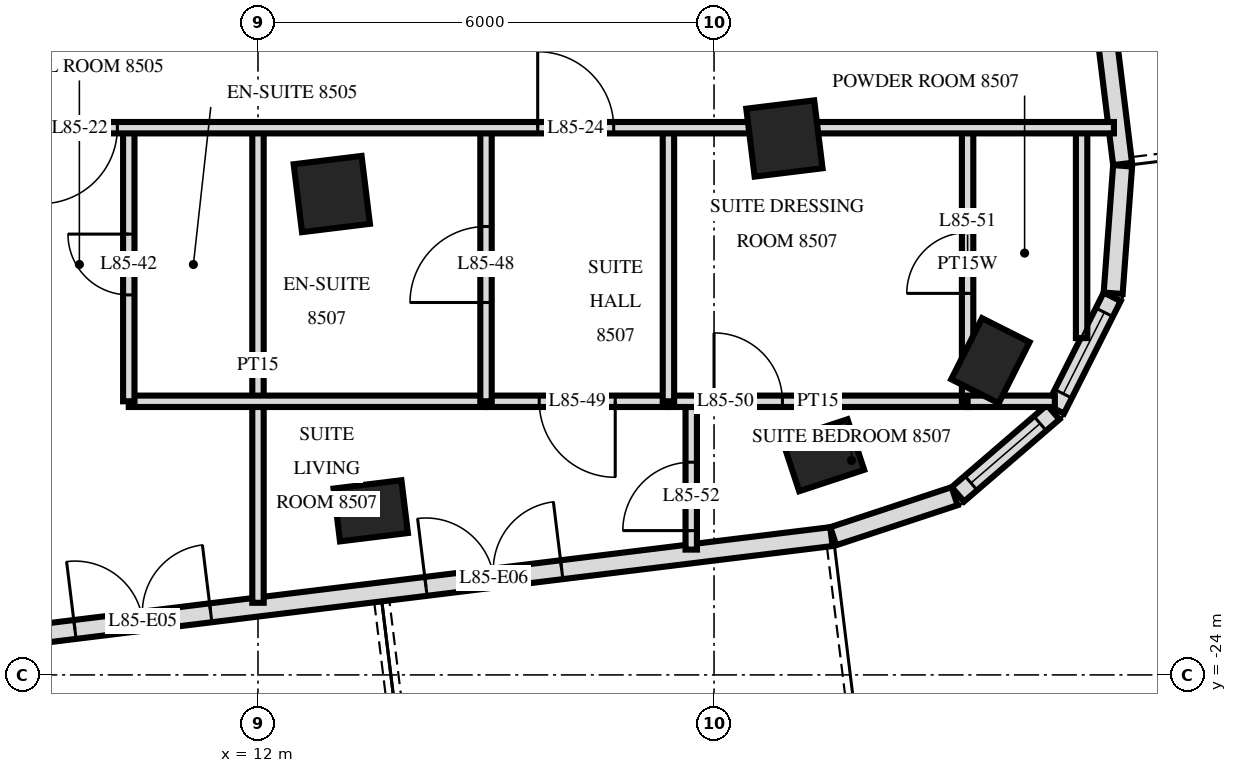
"""IFC4 building model, lengths in metres.
Left out: names, types, materials, properties, quantities, classifications, styles, units other than length and angle.
Written with IfcOpenShell. Run it as: python <this file> out.ifc"""

import sys

from ifc_helpers import new_model, si_unit, direction, frame, frame_2d, origin, origin_2d, place, context, subcontext, project, spatial, rectangle, extrude, element, fill, save


model = new_model("IFC4")
c1 = context("Model", 3, precision=1e-05, world=origin(), true_north=direction((0.0, 1.0)))
c2 = subcontext(c1, "Body", "Model", "MODEL_VIEW")
j1 = project(units=[si_unit("LENGTHUNIT", "METRE"), si_unit("PLANEANGLEUNIT", "RADIAN")], contexts=[c1])
p1 = place(None, origin())
s1 = spatial("IfcSite", under=j1, at=p1, CompositionType="ELEMENT")
p2 = place(p1, origin())
s2 = spatial("IfcBuilding", under=s1, at=p2, CompositionType="ELEMENT")
p3 = place(p2, frame((0.0, 0.0, 322.6)))
s3 = spatial("IfcBuildingStorey", under=s2, at=p3, CompositionType="ELEMENT", Elevation=322.6)
p4 = place(p3, frame((12.971, -17.673, 0.0), z_axis=(0.0, 0.0, 1.0), x_axis=(0.992546151641, 0.121869343405, 0.0)))
e1 = element("IfcColumn", 1, at=p4, inside=s3, PredefinedType="COLUMN", context=c2, shape_type="SweptSolid", body=[
    extrude(rectangle(XDim=0.9, YDim=0.9, at=origin_2d()), origin(), (0.0, 0.0, 1.0), 4.0),
])
p5 = place(p3, frame((13.483, -21.841, 0.0), z_axis=(0.0, 0.0, 1.0), x_axis=(0.992546151641, 0.121869343405, 0.0)))
e2 = element("IfcColumn", 2, at=p5, inside=s3, PredefinedType="COLUMN", context=c2, shape_type="SweptSolid", body=[
    extrude(rectangle(XDim=0.9, YDim=0.7, at=origin_2d()), origin(), (0.0, 0.0, 1.0), 4.0),
])
p6 = place(p3, frame((18.926, -16.942, 0.0), z_axis=(0.0, 0.0, 1.0), x_axis=(0.992546151641, 0.121869343405, 0.0)))
e3 = element("IfcColumn", 3, at=p6, inside=s3, PredefinedType="COLUMN", context=c2, shape_type="SweptSolid", body=[
    extrude(rectangle(XDim=0.9, YDim=0.9, at=origin_2d()), origin(), (0.0, 0.0, 1.0), 4.0),
])
for number, where, z_axis, x_axis in (
    (4, (19.438, -21.11, 0.0), (0.0, 0.0, 1.0), (0.95, 0.313, 0.0)),
    (5, (21.636, -19.866, 0.0), (0.0, 0.0, 1.0), (0.45, 0.893, 0.0)),
):
    element("IfcColumn", number, at=place(p3, frame(where, z_axis=z_axis, x_axis=x_axis)), inside=s3, PredefinedType="COLUMN", context=c2, shape_type="SweptSolid", body=[
        extrude(rectangle(XDim=0.9, YDim=0.7, at=origin_2d()), origin(), (0.0, 0.0, 1.0), 4.0),
    ])
p7 = place(p3, frame((-16.138, -26.561, 0.0), z_axis=(0.0, 0.0, 1.0), x_axis=(0.992546726876, 0.121864658405, 0.0)))
e6 = element("IfcWall", 6, at=p7, inside=s3, PredefinedType="SOLIDWALL", context=c2, shape_type="SweptSolid", body=[
    extrude(rectangle(XDim=35.951, YDim=0.25, at=frame_2d((17.975, 0.0))), origin(), (0.0, 0.0, 1.0), 3.72),
])
p8 = place(p7, frame((0.575, 0.0, 0.0)))
e7 = element("IfcOpeningElement", 7, at=p8, cuts=e6, PredefinedType="OPENING", context=c2, shape_type="SweptSolid", body=[
    extrude(rectangle(XDim=1.8, YDim=2.4, at=frame_2d((0.9, 1.2))), frame((0.0, 0.135, 0.0), z_axis=(0.0, -1.0, 0.0), x_axis=(1.0, 0.0, 0.0)), (0.0, 0.0, 1.0), 0.27),
])
p9 = place(p7, frame((6.576, 0.0, 0.0)))
e8 = element("IfcOpeningElement", 8, at=p9, cuts=e6, PredefinedType="OPENING", context=c2, shape_type="SweptSolid", body=[
    extrude(rectangle(XDim=1.8, YDim=2.4, at=frame_2d((0.9, 1.2))), frame((0.0, 0.135, 0.0), z_axis=(0.0, -1.0, 0.0), x_axis=(1.0, 0.0, 0.0)), (0.0, 0.0, 1.0), 0.27),
])
p10 = place(p7, frame((12.575, 0.0, 0.0)))
e9 = element("IfcOpeningElement", 9, at=p10, cuts=e6, PredefinedType="OPENING", context=c2, shape_type="SweptSolid", body=[
    extrude(rectangle(XDim=1.8, YDim=2.4, at=frame_2d((0.9, 1.2))), frame((0.0, 0.135, 0.0), z_axis=(0.0, -1.0, 0.0), x_axis=(1.0, 0.0, 0.0)), (0.0, 0.0, 1.0), 0.27),
])
p11 = place(p7, frame((18.575, 0.0, 0.0)))
e10 = element("IfcOpeningElement", 10, at=p11, cuts=e6, PredefinedType="OPENING", context=c2, shape_type="SweptSolid", body=[
    extrude(rectangle(XDim=1.8, YDim=2.4, at=frame_2d((0.9, 1.2))), frame((0.0, 0.135, 0.0), z_axis=(0.0, -1.0, 0.0), x_axis=(1.0, 0.0, 0.0)), (0.0, 0.0, 1.0), 0.27),
])
p12 = place(p7, frame((22.528, 0.0, 0.0)))
e11 = element("IfcOpeningElement", 11, at=p12, cuts=e6, PredefinedType="OPENING", context=c2, shape_type="SweptSolid", body=[
    extrude(rectangle(XDim=1.2, YDim=2.4, at=frame_2d((0.6, 1.2))), frame((0.0, 0.135, 0.0), z_axis=(0.0, -1.0, 0.0), x_axis=(1.0, 0.0, 0.0)), (0.0, 0.0, 1.0), 0.27),
])
p13 = place(p7, frame((25.923, 0.0, 0.0)))
e12 = element("IfcOpeningElement", 12, at=p13, cuts=e6, PredefinedType="OPENING", context=c2, shape_type="SweptSolid", body=[
    extrude(rectangle(XDim=1.8, YDim=2.4, at=frame_2d((0.9, 1.2))), frame((0.0, 0.135, 0.0), z_axis=(0.0, -1.0, 0.0), x_axis=(1.0, 0.0, 0.0)), (0.0, 0.0, 1.0), 0.27),
])
p14 = place(p7, frame((30.576, 0.0, 0.0)))
e13 = element("IfcOpeningElement", 13, at=p14, cuts=e6, PredefinedType="OPENING", context=c2, shape_type="SweptSolid", body=[
    extrude(rectangle(XDim=1.8, YDim=2.4, at=frame_2d((0.9, 1.2))), frame((0.0, 0.135, 0.0), z_axis=(0.0, -1.0, 0.0), x_axis=(1.0, 0.0, 0.0)), (0.0, 0.0, 1.0), 0.27),
])
p15 = place(p3, frame((19.568, -22.175, 0.0), z_axis=(0.0, 0.0, 1.0), x_axis=(0.949694735798, 0.313177120489, 0.0)))
e14 = element("IfcWall", 14, at=p15, inside=s3, PredefinedType="SOLIDWALL", context=c2, shape_type="SweptSolid", body=[
    extrude(rectangle(XDim=1.681, YDim=0.25, at=frame_2d((0.841, 0.0))), origin(), (0.0, 0.0, 1.0), 3.72),
])
p16 = place(p3, frame((21.208, -21.624, 0.0), z_axis=(0.0, 0.0, 1.0), x_axis=(0.757568315466, 0.652755886531, 0.0)))
e15 = element("IfcWall", 15, at=p16, inside=s3, PredefinedType="SOLIDWALL", context=c2, shape_type="SweptSolid", body=[
    extrude(rectangle(XDim=1.656, YDim=0.25, at=frame_2d((0.828, 0.0))), origin(), (0.0, 0.0, 1.0), 3.72),
])
p17 = place(p16, frame((0.228, 0.0, 0.9)))
e16 = element("IfcOpeningElement", 16, at=p17, cuts=e15, PredefinedType="OPENING", context=c2, shape_type="SweptSolid", body=[
    extrude(rectangle(XDim=1.2, YDim=1.5, at=frame_2d((0.6, 0.75))), frame((0.0, 0.135, 0.0), z_axis=(0.0, -1.0, 0.0), x_axis=(1.0, 0.0, 0.0)), (0.0, 0.0, 1.0), 0.27),
])
p18 = place(p3, frame((22.493, -20.505, 0.0), z_axis=(0.0, 0.0, 1.0), x_axis=(0.449982385812, 0.893037430604, 0.0)))
e17 = element("IfcWall", 17, at=p18, inside=s3, PredefinedType="SOLIDWALL", context=c2, shape_type="SweptSolid", body=[
    extrude(rectangle(XDim=1.656, YDim=0.25, at=frame_2d((0.828, 0.0))), origin(), (0.0, 0.0, 1.0), 3.72),
])
p19 = place(p18, frame((0.228, 0.0, 0.9)))
e18 = element("IfcOpeningElement", 18, at=p19, cuts=e17, PredefinedType="OPENING", context=c2, shape_type="SweptSolid", body=[
    extrude(rectangle(XDim=1.2, YDim=1.5, at=frame_2d((0.6, 0.75))), frame((0.0, 0.135, 0.0), z_axis=(0.0, -1.0, 0.0), x_axis=(1.0, 0.0, 0.0)), (0.0, 0.0, 1.0), 0.27),
])
p20 = place(p3, frame((23.251, -18.979, 0.0), z_axis=(0.0, 0.0, 1.0), x_axis=(0.074053534713, 0.997254267475, 0.0)))
e19 = element("IfcWall", 19, at=p20, inside=s3, PredefinedType="SOLIDWALL", context=c2, shape_type="SweptSolid", body=[
    extrude(rectangle(XDim=1.681, YDim=0.25, at=frame_2d((0.841, 0.0))), origin(), (0.0, 0.0, 1.0), 3.72),
])
p21 = place(p3, frame((23.375, -17.277, 0.0), z_axis=(0.0, 0.0, 1.0), x_axis=(-0.121862878281, 0.992546945437, 0.0)))
e20 = element("IfcWall", 20, at=p21, inside=s3, PredefinedType="SOLIDWALL", context=c2, shape_type="SweptSolid", body=[
    extrude(rectangle(XDim=19.151, YDim=0.25, at=frame_2d((9.575, 0.0))), origin(), (0.0, 0.0, 1.0), 3.72),
])
p22 = place(p21, frame((2.479, 0.0, 0.0)))
e21 = element("IfcOpeningElement", 21, at=p22, cuts=e20, PredefinedType="OPENING", context=c2, shape_type="SweptSolid", body=[
    extrude(rectangle(XDim=1.8, YDim=2.4, at=frame_2d((0.9, 1.2))), frame((0.0, 0.135, 0.0), z_axis=(0.0, -1.0, 0.0), x_axis=(1.0, 0.0, 0.0)), (0.0, 0.0, 1.0), 0.27),
])
p23 = place(p21, frame((5.575, 0.0, 0.0)))
e22 = element("IfcOpeningElement", 22, at=p23, cuts=e20, PredefinedType="OPENING", context=c2, shape_type="SweptSolid", body=[
    extrude(rectangle(XDim=1.8, YDim=2.4, at=frame_2d((0.9, 1.2))), frame((0.0, 0.135, 0.0), z_axis=(0.0, -1.0, 0.0), x_axis=(1.0, 0.0, 0.0)), (0.0, 0.0, 1.0), 0.27),
])
p24 = place(p21, frame((11.807, 0.0, 0.0)))
e23 = element("IfcOpeningElement", 23, at=p24, cuts=e20, PredefinedType="OPENING", context=c2, shape_type="SweptSolid", body=[
    extrude(rectangle(XDim=1.8, YDim=2.4, at=frame_2d((0.9, 1.2))), frame((0.0, 0.135, 0.0), z_axis=(0.0, -1.0, 0.0), x_axis=(1.0, 0.0, 0.0)), (0.0, 0.0, 1.0), 0.27),
])
p25 = place(p3, frame((22.836, -19.568, 0.0), z_axis=(0.0, 0.0, 1.0), x_axis=(0.0, 1.0, 0.0)))
e24 = element("IfcWall", 24, at=p25, inside=s3, PredefinedType="PLUMBINGWALL", context=c2, shape_type="SweptSolid", body=[
    extrude(rectangle(XDim=2.768, YDim=0.15, at=frame_2d((1.384, 0.0))), origin(), (0.0, 0.0, 1.0), 3.72),
])
p26 = place(p3, frame((21.336, -20.4, 0.0), z_axis=(0.0, 0.0, 1.0), x_axis=(0.0, 1.0, 0.0)))
e25 = element("IfcWall", 25, at=p26, inside=s3, PredefinedType="PLUMBINGWALL", context=c2, shape_type="SweptSolid", body=[
    extrude(rectangle(XDim=3.6, YDim=0.15, at=frame_2d((1.8, 0.0))), origin(), (0.0, 0.0, 1.0), 3.72),
])
p27 = place(p26, frame((1.42, 0.0, 0.0)))
e26 = element("IfcOpeningElement", 26, at=p27, cuts=e25, PredefinedType="OPENING", context=c2, shape_type="SweptSolid", body=[
    extrude(rectangle(XDim=0.8, YDim=2.1, at=frame_2d((0.4, 1.05))), frame((0.0, 0.085, 0.0), z_axis=(0.0, -1.0, 0.0), x_axis=(1.0, 0.0, 0.0)), (0.0, 0.0, 1.0), 0.17),
])
p28 = place(p3, frame((17.7, -22.351, 0.0), z_axis=(0.0, 0.0, 1.0), x_axis=(0.0, 1.0, 0.0)))
e27 = element("IfcWall", 27, at=p28, inside=s3, PredefinedType="PARTITIONING", context=c2, shape_type="SweptSolid", body=[
    extrude(rectangle(XDim=1.951, YDim=0.15, at=frame_2d((0.976, 0.0))), origin(), (0.0, 0.0, 1.0), 3.72),
])
p29 = place(p28, frame((0.25, 0.0, 0.0)))
e28 = element("IfcOpeningElement", 28, at=p29, cuts=e27, PredefinedType="OPENING", context=c2, shape_type="SweptSolid", body=[
    extrude(rectangle(XDim=0.9, YDim=2.1, at=frame_2d((0.45, 1.05))), frame((0.0, 0.085, 0.0), z_axis=(0.0, -1.0, 0.0), x_axis=(1.0, 0.0, 0.0)), (0.0, 0.0, 1.0), 0.17),
])
p30 = place(p3, frame((17.4, -20.4, 0.0), z_axis=(0.0, 0.0, 1.0), x_axis=(0.0, 1.0, 0.0)))
e29 = element("IfcWall", 29, at=p30, inside=s3, PredefinedType="PARTITIONING", context=c2, shape_type="SweptSolid", body=[
    extrude(rectangle(XDim=3.6, YDim=0.15, at=frame_2d((1.8, 0.0))), origin(), (0.0, 0.0, 1.0), 3.72),
])
p31 = place(p3, frame((15.0, -20.4, 0.0), z_axis=(0.0, 0.0, 1.0), x_axis=(0.0, 1.0, 0.0)))
e30 = element("IfcWall", 30, at=p31, inside=s3, PredefinedType="PARTITIONING", context=c2, shape_type="SweptSolid", body=[
    extrude(rectangle(XDim=3.6, YDim=0.15, at=frame_2d((1.8, 0.0))), origin(), (0.0, 0.0, 1.0), 3.72),
])
p32 = place(p31, frame((1.3, 0.0, 0.0)))
e31 = element("IfcOpeningElement", 31, at=p32, cuts=e30, PredefinedType="OPENING", context=c2, shape_type="SweptSolid", body=[
    extrude(rectangle(XDim=1.0, YDim=2.1, at=frame_2d((0.5, 1.05))), frame((0.0, 0.085, 0.0), z_axis=(0.0, -1.0, 0.0), x_axis=(1.0, 0.0, 0.0)), (0.0, 0.0, 1.0), 0.17),
])
p33 = place(p3, frame((12.0, -23.051, 0.0), z_axis=(0.0, 0.0, 1.0), x_axis=(0.0, 1.0, 0.0)))
e32 = element("IfcWall", 32, at=p33, inside=s3, PredefinedType="PARTITIONING", context=c2, shape_type="SweptSolid", body=[
    extrude(rectangle(XDim=6.251, YDim=0.15, at=frame_2d((3.125, 0.0))), origin(), (0.0, 0.0, 1.0), 3.72),
])
p34 = place(p3, frame((10.3, -20.4, 0.0), z_axis=(0.0, 0.0, 1.0), x_axis=(0.0, 1.0, 0.0)))
e33 = element("IfcWall", 33, at=p34, inside=s3, PredefinedType="PARTITIONING", context=c2, shape_type="SweptSolid", body=[
    extrude(rectangle(XDim=3.6, YDim=0.15, at=frame_2d((1.8, 0.0))), origin(), (0.0, 0.0, 1.0), 3.72),
])
p35 = place(p34, frame((1.4, 0.0, 0.0)))
e34 = element("IfcOpeningElement", 34, at=p35, cuts=e33, PredefinedType="OPENING", context=c2, shape_type="SweptSolid", body=[
    extrude(rectangle(XDim=0.8, YDim=2.1, at=frame_2d((0.4, 1.05))), frame((0.0, 0.085, 0.0), z_axis=(0.0, -1.0, 0.0), x_axis=(1.0, 0.0, 0.0)), (0.0, 0.0, 1.0), 0.17),
])
p36 = place(p3, frame((15.0, -20.4, 0.0), z_axis=(0.0, 0.0, 1.0), x_axis=(1.0, 0.0, 0.0)))
e35 = element("IfcWall", 35, at=p36, inside=s3, PredefinedType="PARTITIONING", context=c2, shape_type="SweptSolid", body=[
    extrude(rectangle(XDim=2.4, YDim=0.15, at=frame_2d((1.2, 0.0))), origin(), (0.0, 0.0, 1.0), 3.72),
])
p37 = place(p36, frame((0.7, 0.0, 0.0)))
e36 = element("IfcOpeningElement", 36, at=p37, cuts=e35, PredefinedType="OPENING", context=c2, shape_type="SweptSolid", body=[
    extrude(rectangle(XDim=1.0, YDim=2.1, at=frame_2d((0.5, 1.05))), frame((0.0, 0.085, 0.0), z_axis=(0.0, -1.0, 0.0), x_axis=(1.0, 0.0, 0.0)), (0.0, 0.0, 1.0), 0.17),
])
p38 = place(p3, frame((10.3, -20.4, 0.0), z_axis=(0.0, 0.0, 1.0), x_axis=(1.0, 0.0, 0.0)))
e37 = element("IfcWall", 37, at=p38, inside=s3, PredefinedType="PARTITIONING", context=c2, shape_type="SweptSolid", body=[
    extrude(rectangle(XDim=4.7, YDim=0.15, at=frame_2d((2.35, 0.0))), origin(), (0.0, 0.0, 1.0), 3.72),
])
p39 = place(p3, frame((17.4, -20.4, 0.0), z_axis=(0.0, 0.0, 1.0), x_axis=(1.0, 0.0, 0.0)))
e38 = element("IfcWall", 38, at=p39, inside=s3, PredefinedType="PARTITIONING", context=c2, shape_type="SweptSolid", body=[
    extrude(rectangle(XDim=3.936, YDim=0.15, at=frame_2d((1.968, 0.0))), origin(), (0.0, 0.0, 1.0), 3.72),
])
p40 = place(p39, frame((0.6, 0.0, 0.0)))
e39 = element("IfcOpeningElement", 39, at=p40, cuts=e38, PredefinedType="OPENING", context=c2, shape_type="SweptSolid", body=[
    extrude(rectangle(XDim=0.9, YDim=2.1, at=frame_2d((0.45, 1.05))), frame((0.0, 0.085, 0.0), z_axis=(0.0, -1.0, 0.0), x_axis=(1.0, 0.0, 0.0)), (0.0, 0.0, 1.0), 0.17),
])
p41 = place(p3, frame((21.336, -20.4, 0.0), z_axis=(0.0, 0.0, 1.0), x_axis=(1.0, 0.0, 0.0)))
e40 = element("IfcWall", 40, at=p41, inside=s3, PredefinedType="PLUMBINGWALL", context=c2, shape_type="SweptSolid", body=[
    extrude(rectangle(XDim=1.148, YDim=0.15, at=frame_2d((0.574, 0.0))), origin(), (0.0, 0.0, 1.0), 3.72),
])
p42 = place(p3, frame((-9.3, -16.8, 0.0), z_axis=(0.0, 0.0, 1.0), x_axis=(1.0, 0.0, 0.0)))
e41 = element("IfcWall", 41, at=p42, inside=s3, PredefinedType="PARTITIONING", context=c2, shape_type="SweptSolid", body=[
    extrude(rectangle(XDim=32.561, YDim=0.15, at=frame_2d((16.281, 0.0))), origin(), (0.0, 0.0, 1.0), 3.72),
])
p43 = place(p42, frame((0.4, 0.0, 0.0)))
e42 = element("IfcOpeningElement", 42, at=p43, cuts=e41, PredefinedType="OPENING", context=c2, shape_type="SweptSolid", body=[
    extrude(rectangle(XDim=1.0, YDim=2.1, at=frame_2d((0.5, 1.05))), frame((0.0, 0.085, 0.0), z_axis=(0.0, -1.0, 0.0), x_axis=(1.0, 0.0, 0.0)), (0.0, 0.0, 1.0), 0.17),
])
p44 = place(p42, frame((7.15, 0.0, 0.0)))
e43 = element("IfcOpeningElement", 43, at=p44, cuts=e41, PredefinedType="OPENING", context=c2, shape_type="SweptSolid", body=[
    extrude(rectangle(XDim=1.0, YDim=2.1, at=frame_2d((0.5, 1.05))), frame((0.0, 0.085, 0.0), z_axis=(0.0, -1.0, 0.0), x_axis=(1.0, 0.0, 0.0)), (0.0, 0.0, 1.0), 0.17),
])
p45 = place(p42, frame((9.7, 0.0, 0.0)))
e44 = element("IfcOpeningElement", 44, at=p45, cuts=e41, PredefinedType="OPENING", context=c2, shape_type="SweptSolid", body=[
    extrude(rectangle(XDim=1.0, YDim=2.1, at=frame_2d((0.5, 1.05))), frame((0.0, 0.085, 0.0), z_axis=(0.0, -1.0, 0.0), x_axis=(1.0, 0.0, 0.0)), (0.0, 0.0, 1.0), 0.17),
])
p46 = place(p42, frame((17.149, 0.0, 0.0)))
e45 = element("IfcOpeningElement", 45, at=p46, cuts=e41, PredefinedType="OPENING", context=c2, shape_type="SweptSolid", body=[
    extrude(rectangle(XDim=1.0, YDim=2.1, at=frame_2d((0.5, 1.05))), frame((0.0, 0.085, 0.0), z_axis=(0.0, -1.0, 0.0), x_axis=(1.0, 0.0, 0.0)), (0.0, 0.0, 1.0), 0.17),
])
p47 = place(p42, frame((18.45, 0.0, 0.0)))
e46 = element("IfcOpeningElement", 46, at=p47, cuts=e41, PredefinedType="OPENING", context=c2, shape_type="SweptSolid", body=[
    extrude(rectangle(XDim=1.0, YDim=2.1, at=frame_2d((0.5, 1.05))), frame((0.0, 0.085, 0.0), z_axis=(0.0, -1.0, 0.0), x_axis=(1.0, 0.0, 0.0)), (0.0, 0.0, 1.0), 0.17),
])
p48 = place(p42, frame((24.98, 0.0, 0.0)))
e47 = element("IfcOpeningElement", 47, at=p48, cuts=e41, PredefinedType="OPENING", context=c2, shape_type="SweptSolid", body=[
    extrude(rectangle(XDim=1.0, YDim=2.1, at=frame_2d((0.5, 1.05))), frame((0.0, 0.085, 0.0), z_axis=(0.0, -1.0, 0.0), x_axis=(1.0, 0.0, 0.0)), (0.0, 0.0, 1.0), 0.17),
])
p49 = place(p17, origin())
e48 = element("IfcWindow", 48, at=p49, inside=s3, PartitioningType="SINGLE_PANEL", PredefinedType="WINDOW", context=c2, shape_type="SweptSolid", body=[
    extrude(rectangle(XDim=1.2, YDim=1.5, at=frame_2d((0.6, 0.75))), frame((0.0, 0.03, 0.0), z_axis=(0.0, -1.0, 0.0), x_axis=(1.0, 0.0, 0.0)), (0.0, 0.0, 1.0), 0.06),
])
fill(e16, e48)
p50 = place(p19, origin())
e49 = element("IfcWindow", 49, at=p50, inside=s3, PartitioningType="SINGLE_PANEL", PredefinedType="WINDOW", context=c2, shape_type="SweptSolid", body=[
    extrude(rectangle(XDim=1.2, YDim=1.5, at=frame_2d((0.6, 0.75))), frame((0.0, 0.03, 0.0), z_axis=(0.0, -1.0, 0.0), x_axis=(1.0, 0.0, 0.0)), (0.0, 0.0, 1.0), 0.06),
])
fill(e18, e49)
p51 = place(p13, origin())
e50 = element("IfcDoor", 50, at=p51, inside=s3, OperationType="DOUBLE_DOOR_SINGLE_SWING", PredefinedType="DOOR", context=c2, shape_type="SweptSolid", body=[
    extrude(rectangle(XDim=1.8, YDim=2.4, at=frame_2d((0.9, 1.2))), frame((0.0, 0.025, 0.0), z_axis=(0.0, -1.0, 0.0), x_axis=(1.0, 0.0, 0.0)), (0.0, 0.0, 1.0), 0.05),
])
fill(e12, e50)
p52 = place(p14, origin())
e51 = element("IfcDoor", 51, at=p52, inside=s3, OperationType="DOUBLE_DOOR_SINGLE_SWING", PredefinedType="DOOR", context=c2, shape_type="SweptSolid", body=[
    extrude(rectangle(XDim=1.8, YDim=2.4, at=frame_2d((0.9, 1.2))), frame((0.0, 0.025, 0.0), z_axis=(0.0, -1.0, 0.0), x_axis=(1.0, 0.0, 0.0)), (0.0, 0.0, 1.0), 0.05),
])
fill(e13, e51)
p53 = place(p47, frame((0.5, 0.0, 0.0), z_axis=(0.0, 0.0, 1.0), x_axis=(-1.0, 0.0, 0.0)))
e52 = element("IfcDoor", 52, at=p53, inside=s3, OperationType="SINGLE_SWING_LEFT", PredefinedType="DOOR", context=c2, shape_type="SweptSolid", body=[
    extrude(rectangle(XDim=1.0, YDim=2.1, at=frame_2d((0.0, 1.05))), frame((0.0, -0.025, 0.0), z_axis=(0.0, 1.0, 0.0), x_axis=(-1.0, 0.0, 0.0)), (0.0, 0.0, 1.0), 0.05),
])
fill(e46, e52)
p54 = place(p48, origin())
e53 = element("IfcDoor", 53, at=p54, inside=s3, OperationType="SINGLE_SWING_RIGHT", PredefinedType="DOOR", context=c2, shape_type="SweptSolid", body=[
    extrude(rectangle(XDim=1.0, YDim=2.1, at=frame_2d((0.5, 1.05))), frame((0.0, 0.025, 0.0), z_axis=(0.0, -1.0, 0.0), x_axis=(1.0, 0.0, 0.0)), (0.0, 0.0, 1.0), 0.05),
])
fill(e47, e53)
p55 = place(p35, origin())
e54 = element("IfcDoor", 54, at=p55, inside=s3, OperationType="SINGLE_SWING_LEFT", PredefinedType="DOOR", context=c2, shape_type="SweptSolid", body=[
    extrude(rectangle(XDim=0.8, YDim=2.1, at=frame_2d((0.4, 1.05))), frame((0.0, 0.025, 0.0), z_axis=(0.0, -1.0, 0.0), x_axis=(1.0, 0.0, 0.0)), (0.0, 0.0, 1.0), 0.05),
])
fill(e34, e54)
p56 = place(p32, origin())
e55 = element("IfcDoor", 55, at=p56, inside=s3, OperationType="SINGLE_SWING_RIGHT", PredefinedType="DOOR", context=c2, shape_type="SweptSolid", body=[
    extrude(rectangle(XDim=1.0, YDim=2.1, at=frame_2d((0.5, 1.05))), frame((0.0, 0.025, 0.0), z_axis=(0.0, -1.0, 0.0), x_axis=(1.0, 0.0, 0.0)), (0.0, 0.0, 1.0), 0.05),
])
fill(e31, e55)
p57 = place(p37, frame((0.5, 0.0, 0.0), z_axis=(0.0, 0.0, 1.0), x_axis=(-1.0, 0.0, 0.0)))
e56 = element("IfcDoor", 56, at=p57, inside=s3, OperationType="SINGLE_SWING_RIGHT", PredefinedType="DOOR", context=c2, shape_type="SweptSolid", body=[
    extrude(rectangle(XDim=1.0, YDim=2.1, at=frame_2d((0.0, 1.05))), frame((0.0, -0.025, 0.0), z_axis=(0.0, 1.0, 0.0), x_axis=(-1.0, 0.0, 0.0)), (0.0, 0.0, 1.0), 0.05),
])
fill(e36, e56)
p58 = place(p40, origin())
e57 = element("IfcDoor", 57, at=p58, inside=s3, OperationType="SINGLE_SWING_RIGHT", PredefinedType="DOOR", context=c2, shape_type="SweptSolid", body=[
    extrude(rectangle(XDim=0.9, YDim=2.1, at=frame_2d((0.45, 1.05))), frame((0.0, 0.025, 0.0), z_axis=(0.0, -1.0, 0.0), x_axis=(1.0, 0.0, 0.0)), (0.0, 0.0, 1.0), 0.05),
])
fill(e39, e57)
p59 = place(p27, origin())
e58 = element("IfcDoor", 58, at=p59, inside=s3, OperationType="SINGLE_SWING_RIGHT", PredefinedType="DOOR", context=c2, shape_type="SweptSolid", body=[
    extrude(rectangle(XDim=0.8, YDim=2.1, at=frame_2d((0.4, 1.05))), frame((0.0, 0.025, 0.0), z_axis=(0.0, -1.0, 0.0), x_axis=(1.0, 0.0, 0.0)), (0.0, 0.0, 1.0), 0.05),
])
fill(e26, e58)
p60 = place(p29, origin())
e59 = element("IfcDoor", 59, at=p60, inside=s3, OperationType="SINGLE_SWING_RIGHT", PredefinedType="DOOR", context=c2, shape_type="SweptSolid", body=[
    extrude(rectangle(XDim=0.9, YDim=2.1, at=frame_2d((0.45, 1.05))), frame((0.0, 0.025, 0.0), z_axis=(0.0, -1.0, 0.0), x_axis=(1.0, 0.0, 0.0)), (0.0, 0.0, 1.0), 0.05),
])
fill(e28, e59)
save(model, sys.argv[1])
